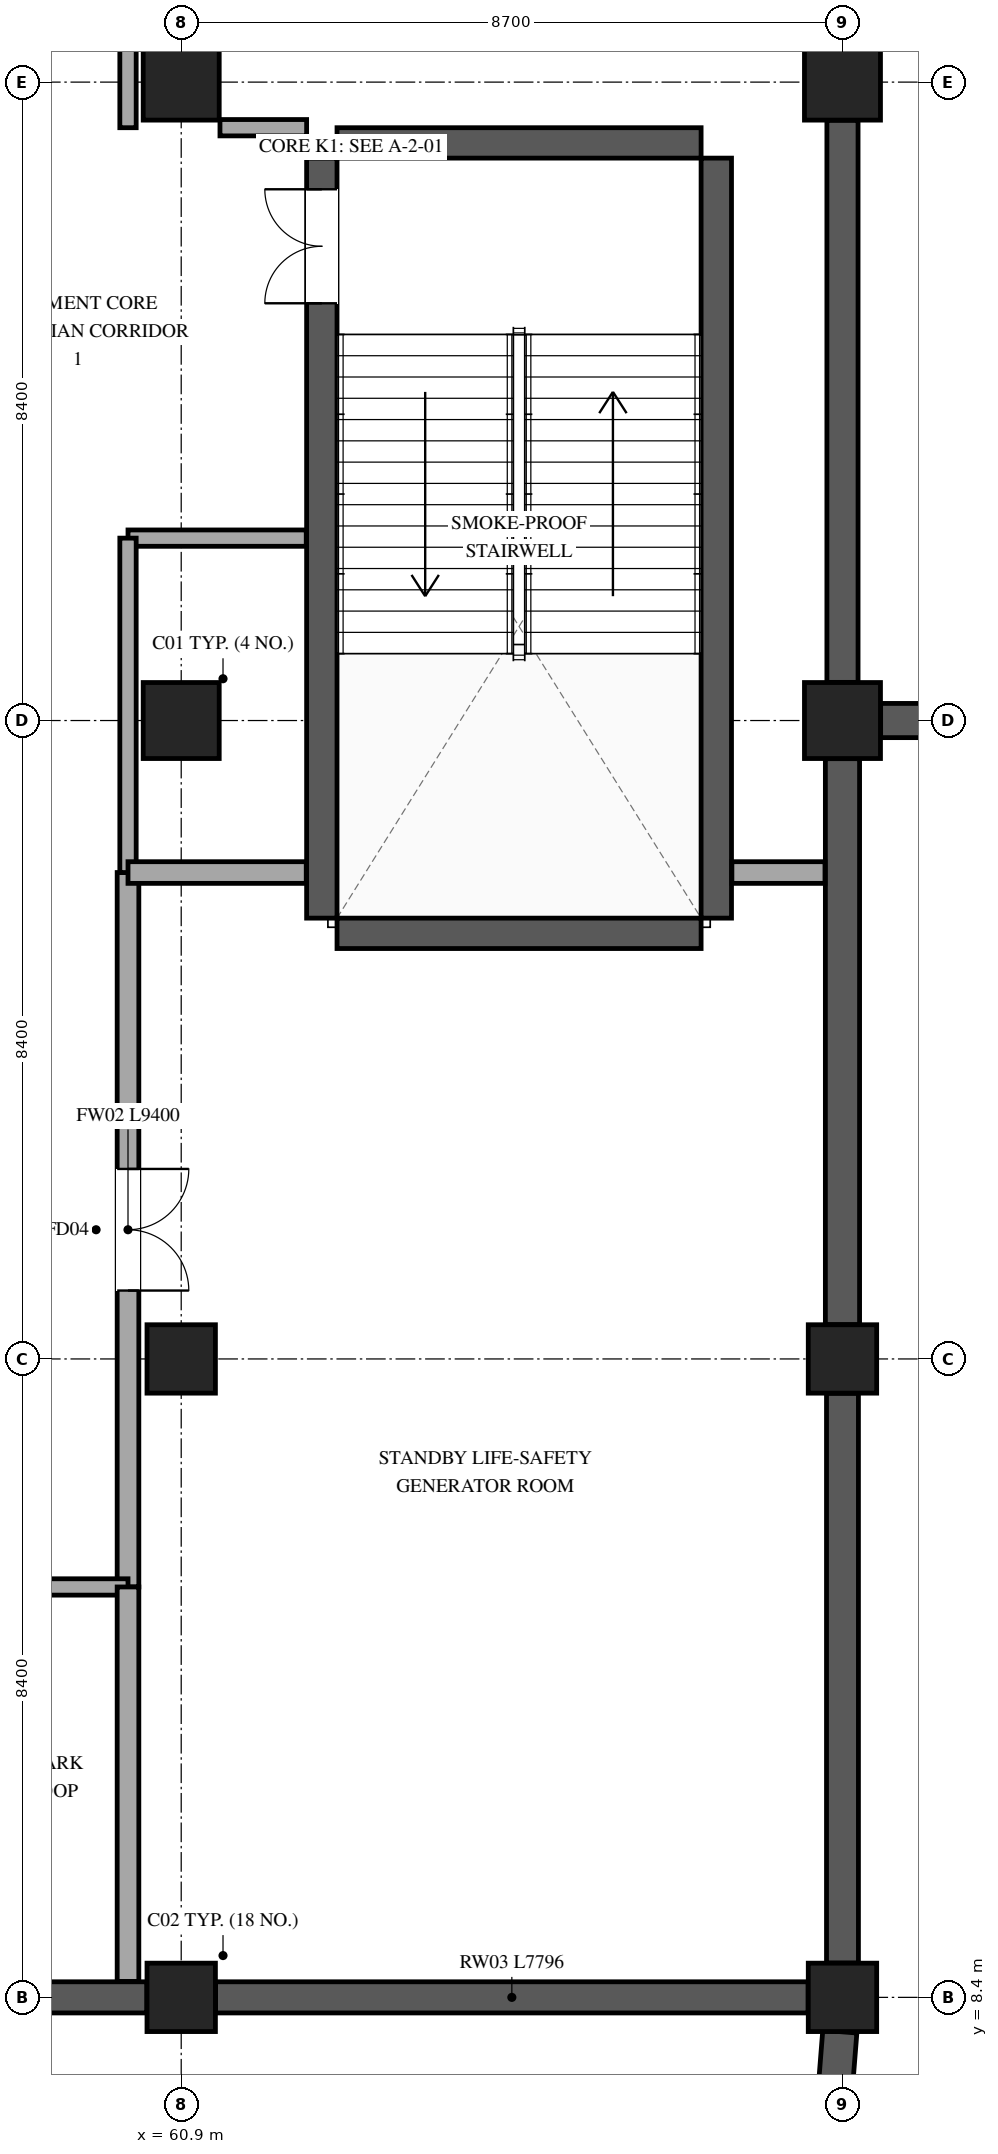
"""IFC4 building model, lengths in metres.
Left out: names, types, materials, properties, quantities, classifications, styles, units other than length and angle.
Written with IfcOpenShell. Run it as: python <this file> out.ifc"""

import sys

from ifc_helpers import new_model, si_unit, direction, frame, frame_2d, origin, origin_2d, place, context, subcontext, project, spatial, rectangle, extrude, element, fill, save


model = new_model("IFC4")
c1 = context("Model", 3, precision=1e-05, world=origin(), true_north=direction((0.0, 1.0)))
c2 = subcontext(c1, "Body", "Model", "MODEL_VIEW")
j1 = project(units=[si_unit("LENGTHUNIT", "METRE"), si_unit("PLANEANGLEUNIT", "RADIAN")], contexts=[c1])
p1 = place(None, origin())
s1 = spatial("IfcSite", under=j1, at=p1, CompositionType="ELEMENT")
p2 = place(p1, origin())
s2 = spatial("IfcBuilding", under=s1, at=p2, CompositionType="ELEMENT")
p3 = place(p2, frame((0.0, 0.0, -4.8)))
s3 = spatial("IfcBuildingStorey", under=s2, at=p3, CompositionType="ELEMENT", Elevation=-4.8)
for number, where, z_axis, x_axis in (
    (1, (60.9, 8.4, 0.0), (0.0, 0.0, 1.0), (1.0, 0.0, 0.0)),
    (2, (60.9, 16.8, 0.0), (0.0, 0.0, 1.0), (1.0, 0.0, 0.0)),
):
    element("IfcColumn", number, at=place(p3, frame(where, z_axis=z_axis, x_axis=x_axis)), inside=s3, PredefinedType="COLUMN", context=c2, shape_type="SweptSolid", body=[
        extrude(rectangle(XDim=0.9, YDim=0.9, at=origin_2d()), origin(), (0.0, 0.0, 1.0), 4.8),
    ])
for number, where, z_axis, x_axis in (
    (3, (60.9, 25.2, 0.0), (0.0, 0.0, 1.0), (1.0, 0.0, 0.0)),
    (4, (60.9, 33.6, 0.0), (0.0, 0.0, 1.0), (1.0, 0.0, 0.0)),
):
    element("IfcColumn", number, at=place(p3, frame(where, z_axis=z_axis, x_axis=x_axis)), inside=s3, PredefinedType="COLUMN", context=c2, shape_type="SweptSolid", body=[
        extrude(rectangle(XDim=1.0, YDim=1.0, at=origin_2d()), origin(), (0.0, 0.0, 1.0), 4.8),
    ])
for number, where, z_axis, x_axis in (
    (5, (69.6, 8.4, 0.0), (0.0, 0.0, 1.0), (1.0, 0.0, 0.0)),
    (6, (69.6, 16.8, 0.0), (0.0, 0.0, 1.0), (1.0, 0.0, 0.0)),
):
    element("IfcColumn", number, at=place(p3, frame(where, z_axis=z_axis, x_axis=x_axis)), inside=s3, PredefinedType="COLUMN", context=c2, shape_type="SweptSolid", body=[
        extrude(rectangle(XDim=0.9, YDim=0.9, at=origin_2d()), origin(), (0.0, 0.0, 1.0), 4.8),
    ])
for number, where, z_axis, x_axis in (
    (7, (69.6, 25.2, 0.0), (0.0, 0.0, 1.0), (1.0, 0.0, 0.0)),
    (8, (69.6, 33.6, 0.0), (0.0, 0.0, 1.0), (1.0, 0.0, 0.0)),
):
    element("IfcColumn", number, at=place(p3, frame(where, z_axis=z_axis, x_axis=x_axis)), inside=s3, PredefinedType="COLUMN", context=c2, shape_type="SweptSolid", body=[
        extrude(rectangle(XDim=1.0, YDim=1.0, at=origin_2d()), origin(), (0.0, 0.0, 1.0), 4.8),
    ])
p4 = place(p3, frame((69.6, 24.698, 0.0), z_axis=(0.0, 0.0, 1.0), x_axis=(0.0, -1.0, 0.0)))
e9 = element("IfcWall", 9, at=p4, inside=s3, PredefinedType="USERDEFINED", context=c2, shape_type="SweptSolid", body=[
    extrude(rectangle(XDim=7.446, YDim=0.45, at=frame_2d((3.723, 0.0))), origin(), (0.0, 0.0, 1.0), 4.46),
])
p5 = place(p3, frame((69.6, 16.348, 0.0), z_axis=(0.0, 0.0, 1.0), x_axis=(0.0, -1.0, 0.0)))
e10 = element("IfcWall", 10, at=p5, inside=s3, PredefinedType="USERDEFINED", context=c2, shape_type="SweptSolid", body=[
    extrude(rectangle(XDim=7.496, YDim=0.42, at=frame_2d((3.748, 0.0))), origin(), (0.0, 0.0, 1.0), 4.46),
])
p6 = place(p3, frame((69.565, 7.949, 0.0), z_axis=(0.0, 0.0, 1.0), x_axis=(-0.078400087506, -0.996921976024, 0.0)))
e11 = element("IfcWall", 11, at=p6, inside=s3, PredefinedType="USERDEFINED", context=c2, shape_type="SweptSolid", body=[
    extrude(rectangle(XDim=0.866, YDim=0.45, at=frame_2d((0.433, 0.0))), origin(), (0.0, 0.0, 1.0), 4.46),
])
p7 = place(p3, frame((77.848, 25.2, 0.0), z_axis=(0.0, 0.0, 1.0), x_axis=(-1.0, 0.0, 0.0)))
e12 = element("IfcWall", 12, at=p7, inside=s3, PredefinedType="USERDEFINED", context=c2, shape_type="SweptSolid", body=[
    extrude(rectangle(XDim=7.746, YDim=0.45, at=frame_2d((3.873, 0.0))), origin(), (0.0, 0.0, 1.0), 4.58),
])
p8 = place(p3, frame((69.6, 33.098, 0.0), z_axis=(0.0, 0.0, 1.0), x_axis=(0.0, -1.0, 0.0)))
e13 = element("IfcWall", 13, at=p8, inside=s3, PredefinedType="USERDEFINED", context=c2, shape_type="SweptSolid", body=[
    extrude(rectangle(XDim=7.396, YDim=0.41, at=frame_2d((3.698, 0.0))), origin(), (0.0, 0.0, 1.0), 4.46),
])
for number, where, z_axis, x_axis in (
    (14, (69.148, 8.4, 0.0), (0.0, 0.0, 1.0), (-1.0, 0.0, 0.0)),
    (15, (60.448, 8.4, 0.0), (0.0, 0.0, 1.0), (-1.0, 0.0, 0.0)),
):
    element("IfcWall", number, at=place(p3, frame(where, z_axis=z_axis, x_axis=x_axis)), inside=s3, PredefinedType="USERDEFINED", context=c2, shape_type="SweptSolid", body=[
        extrude(rectangle(XDim=7.796, YDim=0.41, at=frame_2d((3.898, 0.0))), origin(), (0.0, 0.0, 1.0), 4.46),
    ])
p9 = place(p3, frame((62.75, 22.6, 0.0), z_axis=(0.0, 0.0, 1.0), x_axis=(0.0, 1.0, 0.0)))
e16 = element("IfcWall", 16, at=p9, inside=s3, PredefinedType="SHEAR", context=c2, shape_type="SweptSolid", body=[
    extrude(rectangle(XDim=10.0, YDim=0.4, at=frame_2d((5.0, 0.0))), origin(), (0.0, 0.0, 1.0), 4.8),
])
p10 = place(p9, frame((8.09, 0.0, 0.0)))
e17 = element("IfcOpeningElement", 17, at=p10, cuts=e16, PredefinedType="OPENING", context=c2, shape_type="SweptSolid", body=[
    extrude(rectangle(XDim=1.5, YDim=2.2, at=frame_2d((0.75, 1.1))), frame((0.0, 0.21, 0.0), z_axis=(0.0, -1.0, 0.0), x_axis=(1.0, 0.0, 0.0)), (0.0, 0.0, 1.0), 0.42),
])
p11 = place(p3, frame((67.94, 32.6, 0.0), z_axis=(0.0, 0.0, 1.0), x_axis=(0.0, -1.0, 0.0)))
e18 = element("IfcWall", 18, at=p11, inside=s3, PredefinedType="SHEAR", context=c2, shape_type="SweptSolid", body=[
    extrude(rectangle(XDim=10.0, YDim=0.4, at=frame_2d((5.0, 0.0))), origin(), (0.0, 0.0, 1.0), 4.8),
])
for number, where, z_axis, x_axis in (
    (19, (67.74, 22.4, 0.0), (0.0, 0.0, 1.0), (-1.0, 0.0, 0.0)),
    (20, (62.95, 32.8, 0.0), (0.0, 0.0, 1.0), (1.0, 0.0, 0.0)),
):
    element("IfcWall", number, at=place(p3, frame(where, z_axis=z_axis, x_axis=x_axis)), inside=s3, PredefinedType="SHEAR", context=c2, shape_type="SweptSolid", body=[
        extrude(rectangle(XDim=4.79, YDim=0.4, at=frame_2d((2.395, 0.0))), origin(), (0.0, 0.0, 1.0), 4.8),
    ])
p12 = place(p3, frame((60.2, 23.2, 0.0), z_axis=(0.0, 0.0, 1.0), x_axis=(0.0, -1.0, 0.0)))
e21 = element("IfcWall", 21, at=p12, inside=s3, PredefinedType="STANDARD", context=c2, shape_type="SweptSolid", body=[
    extrude(rectangle(XDim=9.4, YDim=0.285, at=frame_2d((4.7, 0.0))), origin(), (0.0, 0.0, 1.0), 3.65),
])
p13 = place(p12, frame((3.9, 0.0, 0.0)))
e22 = element("IfcOpeningElement", 22, at=p13, cuts=e21, PredefinedType="OPENING", context=c2, shape_type="SweptSolid", body=[
    extrude(rectangle(XDim=1.6, YDim=2.25, at=frame_2d((0.8, 1.125))), frame((0.0, 0.152, 0.0), z_axis=(0.0, -1.0, 0.0), x_axis=(1.0, 0.0, 0.0)), (0.0, 0.0, 1.0), 0.305),
])
p14 = place(p3, frame((62.545, 27.6, 0.0), z_axis=(0.0, 0.0, 1.0), x_axis=(-1.0, 0.0, 0.0)))
e23 = element("IfcWall", 23, at=p14, inside=s3, PredefinedType="PARTITIONING", context=c2, shape_type="SweptSolid", body=[
    extrude(rectangle(XDim=2.345, YDim=0.215, at=frame_2d((1.172, 0.0))), origin(), (0.0, 0.0, 1.0), 3.65),
])
p15 = place(p3, frame((60.2, 27.6, 0.0), z_axis=(0.0, 0.0, 1.0), x_axis=(0.0, -1.0, 0.0)))
e24 = element("IfcWall", 24, at=p15, inside=s3, PredefinedType="PARTITIONING", context=c2, shape_type="SweptSolid", body=[
    extrude(rectangle(XDim=4.4, YDim=0.215, at=frame_2d((2.2, 0.0))), origin(), (0.0, 0.0, 1.0), 3.65),
])
p16 = place(p3, frame((60.2, 47.4, 0.0), z_axis=(0.0, 0.0, 1.0), x_axis=(0.0, -1.0, 0.0)))
e25 = element("IfcWall", 25, at=p16, inside=s3, PredefinedType="PARTITIONING", context=c2, shape_type="SweptSolid", body=[
    extrude(rectangle(XDim=14.4, YDim=0.215, at=frame_2d((7.2, 0.0))), origin(), (0.0, 0.0, 1.0), 3.65),
])
p17 = place(p3, frame((61.41, 33.0, 0.0), z_axis=(0.0, 0.0, 1.0), x_axis=(1.0, 0.0, 0.0)))
e26 = element("IfcWall", 26, at=p17, inside=s3, PredefinedType="PARTITIONING", context=c2, shape_type="SweptSolid", body=[
    extrude(rectangle(XDim=1.14, YDim=0.215, at=frame_2d((0.57, 0.0))), origin(), (0.0, 0.0, 1.0), 4.44),
])
p18 = place(p3, frame((60.2, 13.8, 0.0), z_axis=(0.0, 0.0, 1.0), x_axis=(-1.0, 0.0, 0.0)))
e27 = element("IfcWall", 27, at=p18, inside=s3, PredefinedType="PARTITIONING", context=c2, shape_type="SweptSolid", body=[
    extrude(rectangle(XDim=3.4, YDim=0.215, at=frame_2d((1.7, 0.0))), origin(), (0.0, 0.0, 1.0), 4.44),
])
p19 = place(p3, frame((60.2, 23.2, 0.0), z_axis=(0.0, 0.0, 1.0), x_axis=(1.0, 0.0, 0.0)))
e28 = element("IfcWall", 28, at=p19, inside=s3, PredefinedType="STANDARD", context=c2, shape_type="SweptSolid", body=[
    extrude(rectangle(XDim=2.345, YDim=0.285, at=frame_2d((1.172, 0.0))), origin(), (0.0, 0.0, 1.0), 3.65),
])
p20 = place(p3, frame((68.145, 23.2, 0.0), z_axis=(0.0, 0.0, 1.0), x_axis=(1.0, 0.0, 0.0)))
e29 = element("IfcWall", 29, at=p20, inside=s3, PredefinedType="STANDARD", context=c2, shape_type="SweptSolid", body=[
    extrude(rectangle(XDim=1.225, YDim=0.285, at=frame_2d((0.613, 0.0))), origin(), (0.0, 0.0, 1.0), 3.8),
])
p21 = place(p3, frame((60.2, 8.61, 0.0), z_axis=(0.0, 0.0, 1.0), x_axis=(0.0, 1.0, 0.0)))
e30 = element("IfcWall", 30, at=p21, inside=s3, PredefinedType="STANDARD", context=c2, shape_type="SweptSolid", body=[
    extrude(rectangle(XDim=5.19, YDim=0.285, at=frame_2d((2.595, 0.0))), origin(), (0.0, 0.0, 1.0), 3.65),
])
p22 = place(p10, origin())
e31 = element("IfcDoor", 31, at=p22, inside=s3, OperationType="DOUBLE_DOOR_SINGLE_SWING", PredefinedType="DOOR", context=c2, shape_type="SweptSolid", body=[
    extrude(rectangle(XDim=1.5, YDim=2.2, at=frame_2d((0.75, 1.1))), frame((0.0, 0.025, 0.0), z_axis=(0.0, -1.0, 0.0), x_axis=(1.0, 0.0, 0.0)), (0.0, 0.0, 1.0), 0.05),
])
fill(e17, e31)
p23 = place(p13, origin())
e32 = element("IfcDoor", 32, at=p23, inside=s3, OperationType="DOUBLE_DOOR_SINGLE_SWING", PredefinedType="DOOR", context=c2, shape_type="SweptSolid", body=[
    extrude(rectangle(XDim=1.6, YDim=2.25, at=frame_2d((0.8, 1.125))), frame((0.0, 0.025, 0.0), z_axis=(0.0, -1.0, 0.0), x_axis=(1.0, 0.0, 0.0)), (0.0, 0.0, 1.0), 0.05),
])
fill(e22, e32)
save(model, sys.argv[1])
